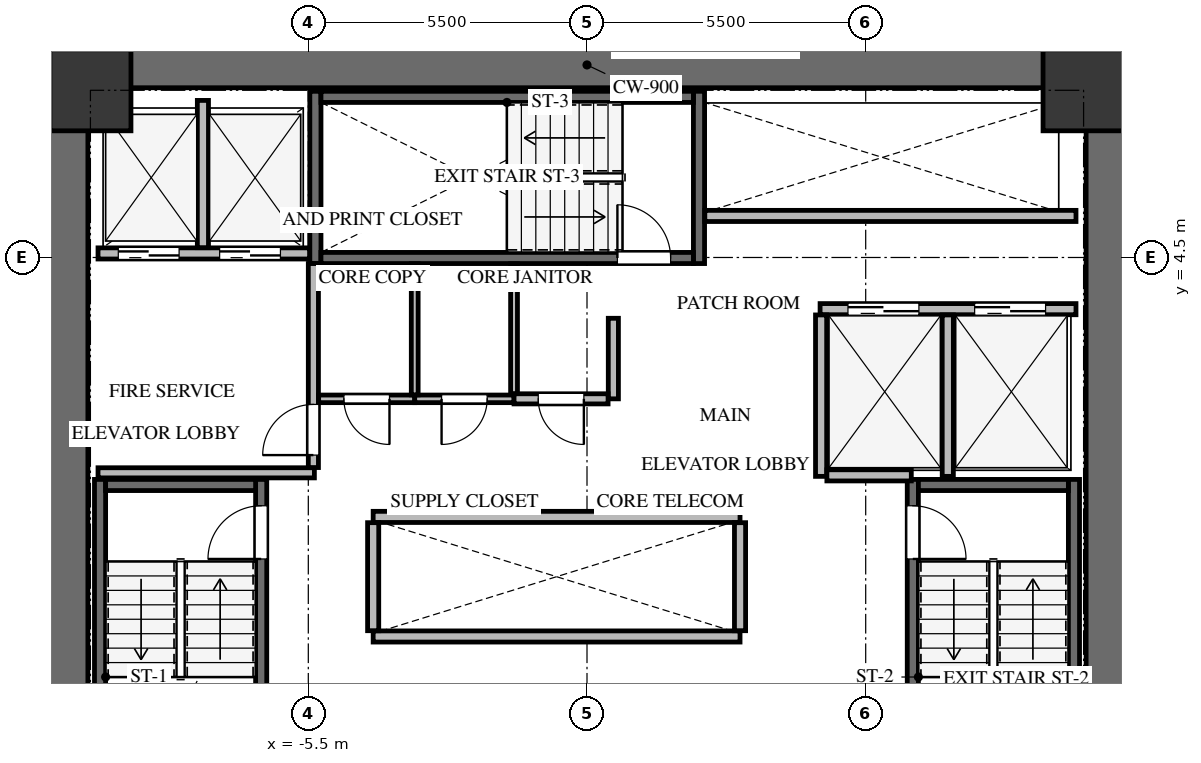
"""IFC4 building model, lengths in metres.
Left out: names, types, materials, properties, quantities, classifications, styles, units other than length and angle.
Written with IfcOpenShell. Run it as: python <this file> out.ifc"""

import sys

from ifc_helpers import new_model, si_unit, direction, frame, frame_2d, origin, origin_2d, place, context, subcontext, project, spatial, rectangle, extrude, source, transform, mapped, element, fill, save


model = new_model("IFC4")
c1 = context("Model", 3, precision=1e-05, world=origin(), true_north=direction((0.0, 1.0)))
c2 = subcontext(c1, "Body", "Model", "MODEL_VIEW")
j1 = project(units=[si_unit("LENGTHUNIT", "METRE"), si_unit("PLANEANGLEUNIT", "RADIAN")], contexts=[c1])
p1 = place(None, origin())
s1 = spatial("IfcSite", under=j1, at=p1, CompositionType="ELEMENT")
p2 = place(p1, origin())
s2 = spatial("IfcBuilding", under=s1, at=p2, CompositionType="ELEMENT")
p3 = place(p2, frame((0.0, 0.0, 78.3)))
s3 = spatial("IfcBuildingStorey", under=s2, at=p3, CompositionType="ELEMENT", Elevation=78.3)
for number, where, z_axis, x_axis in (
    (1, (-10.3, -8.75, 0.0), (0.0, 0.0, 1.0), (0.0, 1.0, 0.0)),
    (2, (10.3, -8.75, 0.0), (0.0, 0.0, 1.0), (0.0, 1.0, 0.0)),
):
    element("IfcWall", number, at=place(p3, frame(where, z_axis=z_axis, x_axis=x_axis)), inside=s3, PredefinedType="SHEAR", context=c2, shape_type="SweptSolid", body=[
        extrude(rectangle(XDim=17.5, YDim=0.9, at=frame_2d((8.75, 0.0))), origin(), (0.0, 0.0, 1.0), 3.0),
    ])
p4 = place(p3, frame((-9.85, 8.3, 0.0), z_axis=(0.0, 0.0, 1.0), x_axis=(1.0, 0.0, 0.0)))
e3 = element("IfcWall", 3, at=p4, inside=s3, PredefinedType="SHEAR", context=c2, shape_type="SweptSolid", body=[
    extrude(rectangle(XDim=19.7, YDim=0.9, at=frame_2d((9.85, 0.0))), origin(), (0.0, 0.0, 1.0), 3.0),
])
p5 = place(p3, frame((-6.43, -7.77, -0.24), z_axis=(0.0, 0.0, 1.0), x_axis=(0.0, 1.0, 0.0)))
e4 = element("IfcWall", 4, at=p5, inside=s3, PredefinedType="SHEAR", context=c2, shape_type="SweptSolid", body=[
    extrude(rectangle(XDim=7.89, YDim=0.22, at=frame_2d((3.945, 0.0))), origin(), (0.0, 0.0, 1.0), 3.0),
])
p6 = place(p5, frame((6.32, 0.0, 0.0)))
e5 = element("IfcOpeningElement", 5, at=p6, cuts=e4, PredefinedType="OPENING", context=c2, shape_type="SweptSolid", body=[
    extrude(rectangle(XDim=1.05, YDim=2.15, at=frame_2d((0.525, 1.075))), frame((0.0, 0.12, 0.0), z_axis=(0.0, -1.0, 0.0), x_axis=(1.0, 0.0, 0.0)), (0.0, 0.0, 1.0), 0.24),
])
p7 = place(p3, frame((-9.61, 0.12, -0.24), z_axis=(0.0, 0.0, 1.0), x_axis=(0.0, -1.0, 0.0)))
e6 = element("IfcWall", 6, at=p7, inside=s3, PredefinedType="SHEAR", context=c2, shape_type="SweptSolid", body=[
    extrude(rectangle(XDim=7.89, YDim=0.22, at=frame_2d((3.945, 0.0))), origin(), (0.0, 0.0, 1.0), 3.0),
])
p8 = place(p3, frame((-6.54, 0.01, -0.24), z_axis=(0.0, 0.0, 1.0), x_axis=(-1.0, 0.0, 0.0)))
e7 = element("IfcWall", 7, at=p8, inside=s3, PredefinedType="SHEAR", context=c2, shape_type="SweptSolid", body=[
    extrude(rectangle(XDim=2.96, YDim=0.22, at=frame_2d((1.48, 0.0))), origin(), (0.0, 0.0, 1.0), 3.0),
])
p9 = place(p3, frame((9.61, -7.77, -0.24), z_axis=(0.0, 0.0, 1.0), x_axis=(0.0, 1.0, 0.0)))
e8 = element("IfcWall", 8, at=p9, inside=s3, PredefinedType="SHEAR", context=c2, shape_type="SweptSolid", body=[
    extrude(rectangle(XDim=7.89, YDim=0.22, at=frame_2d((3.945, 0.0))), origin(), (0.0, 0.0, 1.0), 3.0),
])
p10 = place(p3, frame((6.43, 0.12, -0.24), z_axis=(0.0, 0.0, 1.0), x_axis=(0.0, -1.0, 0.0)))
e9 = element("IfcWall", 9, at=p10, inside=s3, PredefinedType="SHEAR", context=c2, shape_type="SweptSolid", body=[
    extrude(rectangle(XDim=7.89, YDim=0.22, at=frame_2d((3.945, 0.0))), origin(), (0.0, 0.0, 1.0), 3.0),
])
p11 = place(p10, frame((0.52, 0.0, 0.0)))
e10 = element("IfcOpeningElement", 10, at=p11, cuts=e9, PredefinedType="OPENING", context=c2, shape_type="SweptSolid", body=[
    extrude(rectangle(XDim=1.05, YDim=2.15, at=frame_2d((0.525, 1.075))), frame((0.0, 0.12, 0.0), z_axis=(0.0, -1.0, 0.0), x_axis=(1.0, 0.0, 0.0)), (0.0, 0.0, 1.0), 0.24),
])
p12 = place(p3, frame((9.5, 0.01, -0.24), z_axis=(0.0, 0.0, 1.0), x_axis=(-1.0, 0.0, 0.0)))
e11 = element("IfcWall", 11, at=p12, inside=s3, PredefinedType="SHEAR", context=c2, shape_type="SweptSolid", body=[
    extrude(rectangle(XDim=2.96, YDim=0.22, at=frame_2d((1.48, 0.0))), origin(), (0.0, 0.0, 1.0), 3.0),
])
for number, where, z_axis, x_axis in (
    (12, (2.21, 4.38, -0.24), (0.0, 0.0, 1.0), (0.0, 1.0, 0.0)),
    (13, (-5.36, 7.78, -0.24), (0.0, 0.0, 1.0), (0.0, -1.0, 0.0)),
):
    element("IfcWall", number, at=place(p3, frame(where, z_axis=z_axis, x_axis=x_axis)), inside=s3, PredefinedType="SHEAR", context=c2, shape_type="SweptSolid", body=[
        extrude(rectangle(XDim=3.4, YDim=0.22, at=frame_2d((1.7, 0.0))), origin(), (0.0, 0.0, 1.0), 3.0),
    ])
p13 = place(p3, frame((-5.25, 4.49, -0.24), z_axis=(0.0, 0.0, 1.0), x_axis=(1.0, 0.0, 0.0)))
e14 = element("IfcWall", 14, at=p13, inside=s3, PredefinedType="SHEAR", context=c2, shape_type="SweptSolid", body=[
    extrude(rectangle(XDim=7.35, YDim=0.22, at=frame_2d((3.675, 0.0))), origin(), (0.0, 0.0, 1.0), 3.0),
])
p14 = place(p13, frame((5.85, 0.0, 0.0)))
e15 = element("IfcOpeningElement", 15, at=p14, cuts=e14, PredefinedType="OPENING", context=c2, shape_type="SweptSolid", body=[
    extrude(rectangle(XDim=1.05, YDim=2.15, at=frame_2d((0.525, 1.075))), frame((0.0, 0.12, 0.0), z_axis=(0.0, -1.0, 0.0), x_axis=(1.0, 0.0, 0.0)), (0.0, 0.0, 1.0), 0.24),
])
p15 = place(p3, frame((2.1, 7.67, -0.24), z_axis=(0.0, 0.0, 1.0), x_axis=(-1.0, 0.0, 0.0)))
e16 = element("IfcWall", 16, at=p15, inside=s3, PredefinedType="SHEAR", context=c2, shape_type="SweptSolid", body=[
    extrude(rectangle(XDim=7.35, YDim=0.22, at=frame_2d((3.675, 0.0))), origin(), (0.0, 0.0, 1.0), 3.0),
])
m1 = source(origin(), c2, "Body", "SweptSolid", [
    extrude(rectangle(XDim=1.6, YDim=1.6, at=origin_2d()), origin(), (0.0, 0.0, 1.0), 3.0),
])
for number, where, z_axis, x_axis in (
    (17, (9.8, 7.8, -0.24), (0.0, 0.0, 1.0), (1.0, 0.0, 0.0)),
    (18, (-9.8, 7.8, -0.24), (0.0, 0.0, 1.0), (1.0, 0.0, 0.0)),
):
    element("IfcColumn", number, at=place(p3, frame(where, z_axis=z_axis, x_axis=x_axis)), inside=s3, PredefinedType="COLUMN", context=c2, shape_type="MappedRepresentation", body=[
        mapped(m1, transform((0.0, 0.0, 0.0), x_axis=(1.0, 0.0, 0.0), y_axis=(0.0, 1.0, 0.0), z_axis=(0.0, 0.0, 1.0), scale=1.0)),
    ])
p16 = place(p3, frame((-9.65, 4.58, 0.0), z_axis=(0.0, 0.0, 1.0), x_axis=(1.0, 0.0, 0.0)))
e19 = element("IfcWall", 19, at=p16, inside=s3, PredefinedType="SOLIDWALL", context=c2, shape_type="SweptSolid", body=[
    extrude(rectangle(XDim=4.175, YDim=0.22, at=frame_2d((2.087, 0.0))), origin(), (0.0, 0.0, 1.0), 2.745),
])
p17 = place(p16, frame((0.4, 0.0, 0.0)))
e20 = element("IfcOpeningElement", 20, at=p17, cuts=e19, PredefinedType="OPENING", context=c2, shape_type="SweptSolid", body=[
    extrude(rectangle(XDim=1.2, YDim=2.15, at=frame_2d((0.6, 1.075))), frame((0.0, 0.12, 0.0), z_axis=(0.0, -1.0, 0.0), x_axis=(1.0, 0.0, 0.0)), (0.0, 0.0, 1.0), 0.24),
])
p18 = place(p16, frame((2.4, 0.0, 0.0)))
e21 = element("IfcOpeningElement", 21, at=p18, cuts=e19, PredefinedType="OPENING", context=c2, shape_type="SweptSolid", body=[
    extrude(rectangle(XDim=1.2, YDim=2.15, at=frame_2d((0.6, 1.075))), frame((0.0, 0.12, 0.0), z_axis=(0.0, -1.0, 0.0), x_axis=(1.0, 0.0, 0.0)), (0.0, 0.0, 1.0), 0.24),
])
p19 = place(p3, frame((-7.58, 4.694, 0.0), z_axis=(0.0, 0.0, 1.0), x_axis=(0.0, 1.0, 0.0)))
e22 = element("IfcWall", 22, at=p19, inside=s3, PredefinedType="SOLIDWALL", context=c2, shape_type="SweptSolid", body=[
    extrude(rectangle(XDim=2.906, YDim=0.22, at=frame_2d((1.453, 0.0))), origin(), (0.0, 0.0, 1.0), 2.745),
])
p20 = place(p3, frame((-9.65, 0.25, 0.0), z_axis=(0.0, 0.0, 1.0), x_axis=(1.0, 0.0, 0.0)))
e23 = element("IfcWall", 23, at=p20, inside=s3, PredefinedType="SOLIDWALL", context=c2, shape_type="SweptSolid", body=[
    extrude(rectangle(XDim=4.27, YDim=0.2, at=frame_2d((2.135, 0.0))), origin(), (0.0, 0.0, 1.0), 2.745),
])
p21 = place(p3, frame((-5.4, 0.354, 0.0), z_axis=(0.0, 0.0, 1.0), x_axis=(0.0, 1.0, 0.0)))
e24 = element("IfcWall", 24, at=p21, inside=s3, PredefinedType="SOLIDWALL", context=c2, shape_type="SweptSolid", body=[
    extrude(rectangle(XDim=4.026, YDim=0.2, at=frame_2d((2.013, 0.0))), origin(), (0.0, 0.0, 1.0), 2.745),
])
p22 = place(p21, frame((0.246, 0.0, 0.0)))
e25 = element("IfcOpeningElement", 25, at=p22, cuts=e24, PredefinedType="OPENING", context=c2, shape_type="SweptSolid", body=[
    extrude(rectangle(XDim=1.0, YDim=2.15, at=frame_2d((0.5, 1.075))), frame((0.0, 0.11, 0.0), z_axis=(0.0, -1.0, 0.0), x_axis=(1.0, 0.0, 0.0)), (0.0, 0.0, 1.0), 0.22),
])
p23 = place(p3, frame((4.6, 3.48, 0.0), z_axis=(0.0, 0.0, 1.0), x_axis=(1.0, 0.0, 0.0)))
e26 = element("IfcWall", 26, at=p23, inside=s3, PredefinedType="SOLIDWALL", context=c2, shape_type="SweptSolid", body=[
    extrude(rectangle(XDim=5.05, YDim=0.22, at=frame_2d((2.525, 0.0))), origin(), (0.0, 0.0, 1.0), 2.745),
])
p24 = place(p23, frame((0.55, 0.0, 0.0)))
e27 = element("IfcOpeningElement", 27, at=p24, cuts=e26, PredefinedType="OPENING", context=c2, shape_type="SweptSolid", body=[
    extrude(rectangle(XDim=1.4, YDim=2.15, at=frame_2d((0.7, 1.075))), frame((0.0, 0.12, 0.0), z_axis=(0.0, -1.0, 0.0), x_axis=(1.0, 0.0, 0.0)), (0.0, 0.0, 1.0), 0.24),
])
p25 = place(p23, frame((3.05, 0.0, 0.0)))
e28 = element("IfcOpeningElement", 28, at=p25, cuts=e26, PredefinedType="OPENING", context=c2, shape_type="SweptSolid", body=[
    extrude(rectangle(XDim=1.4, YDim=2.15, at=frame_2d((0.7, 1.075))), frame((0.0, 0.12, 0.0), z_axis=(0.0, -1.0, 0.0), x_axis=(1.0, 0.0, 0.0)), (0.0, 0.0, 1.0), 0.24),
])
for number, where, z_axis, x_axis in (
    (29, (4.62, 0.18, 0.0), (0.0, 0.0, 1.0), (0.0, 1.0, 0.0)),
    (30, (7.12, 0.18, 0.0), (0.0, 0.0, 1.0), (0.0, 1.0, 0.0)),
):
    element("IfcWall", number, at=place(p3, frame(where, z_axis=z_axis, x_axis=x_axis)), inside=s3, PredefinedType="SOLIDWALL", context=c2, shape_type="SweptSolid", body=[
        extrude(rectangle(XDim=3.186, YDim=0.22, at=frame_2d((1.593, 0.0))), origin(), (0.0, 0.0, 1.0), 2.745),
    ])
p26 = place(p3, frame((4.734, 0.2, 0.0), z_axis=(0.0, 0.0, 1.0), x_axis=(1.0, 0.0, 0.0)))
e31 = element("IfcWall", 31, at=p26, inside=s3, PredefinedType="SOLIDWALL", context=c2, shape_type="SweptSolid", body=[
    extrude(rectangle(XDim=1.666, YDim=0.22, at=frame_2d((0.833, 0.0))), origin(), (0.0, 0.0, 1.0), 2.745),
])
for number, where, z_axis, x_axis in (
    (32, (-4.22, -2.98, 0.0), (0.0, 0.0, 1.0), (1.0, 0.0, 0.0)),
    (33, (-4.22, -0.62, 0.0), (0.0, 0.0, 1.0), (1.0, 0.0, 0.0)),
):
    element("IfcWall", number, at=place(p3, frame(where, z_axis=z_axis, x_axis=x_axis)), inside=s3, PredefinedType="SOLIDWALL", context=c2, shape_type="SweptSolid", body=[
        extrude(rectangle(XDim=7.24, YDim=0.22, at=frame_2d((3.62, 0.0))), origin(), (0.0, 0.0, 1.0), 2.745),
    ])
for number, where, z_axis, x_axis in (
    (34, (-4.22, -2.866, 0.0), (0.0, 0.0, 1.0), (0.0, 1.0, 0.0)),
    (35, (3.02, -2.866, 0.0), (0.0, 0.0, 1.0), (0.0, 1.0, 0.0)),
):
    element("IfcWall", number, at=place(p3, frame(where, z_axis=z_axis, x_axis=x_axis)), inside=s3, PredefinedType="SOLIDWALL", context=c2, shape_type="SweptSolid", body=[
        extrude(rectangle(XDim=2.132, YDim=0.22, at=frame_2d((1.066, 0.0))), origin(), (0.0, 0.0, 1.0), 2.745),
    ])
p27 = place(p3, frame((2.325, 5.32, 0.0), z_axis=(0.0, 0.0, 1.0), x_axis=(1.0, 0.0, 0.0)))
e36 = element("IfcWall", 36, at=p27, inside=s3, PredefinedType="SOLIDWALL", context=c2, shape_type="SweptSolid", body=[
    extrude(rectangle(XDim=7.325, YDim=0.22, at=frame_2d((3.663, 0.0))), origin(), (0.0, 0.0, 1.0), 2.745),
])
p28 = place(p3, frame((-3.4, 1.71, 0.0), z_axis=(0.0, 0.0, 1.0), x_axis=(-1.0, 0.0, 0.0)))
e37 = element("IfcWall", 37, at=p28, inside=s3, PredefinedType="PARTITIONING", context=c2, shape_type="SweptSolid", body=[
    extrude(rectangle(XDim=1.896, YDim=0.15, at=frame_2d((0.948, 0.0))), origin(), (0.0, 0.0, 1.0), 2.745),
])
p29 = place(p28, frame((0.498, 0.0, 0.0)))
e38 = element("IfcOpeningElement", 38, at=p29, cuts=e37, PredefinedType="OPENING", context=c2, shape_type="SweptSolid", body=[
    extrude(rectangle(XDim=0.9, YDim=2.05, at=frame_2d((0.45, 1.025))), frame((0.0, 0.085, 0.0), z_axis=(0.0, -1.0, 0.0), x_axis=(1.0, 0.0, 0.0)), (0.0, 0.0, 1.0), 0.17),
])
p30 = place(p3, frame((-1.44, 1.71, 0.0), z_axis=(0.0, 0.0, 1.0), x_axis=(-1.0, 0.0, 0.0)))
e39 = element("IfcWall", 39, at=p30, inside=s3, PredefinedType="PARTITIONING", context=c2, shape_type="SweptSolid", body=[
    extrude(rectangle(XDim=1.96, YDim=0.15, at=frame_2d((0.98, 0.0))), origin(), (0.0, 0.0, 1.0), 2.745),
])
p31 = place(p30, frame((0.53, 0.0, 0.0)))
e40 = element("IfcOpeningElement", 40, at=p31, cuts=e39, PredefinedType="OPENING", context=c2, shape_type="SweptSolid", body=[
    extrude(rectangle(XDim=0.9, YDim=2.05, at=frame_2d((0.45, 1.025))), frame((0.0, 0.085, 0.0), z_axis=(0.0, -1.0, 0.0), x_axis=(1.0, 0.0, 0.0)), (0.0, 0.0, 1.0), 0.17),
])
p32 = place(p3, frame((0.52, 3.3, 0.0), z_axis=(0.0, 0.0, 1.0), x_axis=(0.0, -1.0, 0.0)))
e41 = element("IfcWall", 41, at=p32, inside=s3, PredefinedType="SOLIDWALL", context=c2, shape_type="SweptSolid", body=[
    extrude(rectangle(XDim=1.59, YDim=0.2, at=frame_2d((0.795, 0.0))), origin(), (0.0, 0.0, 1.0), 2.745),
])
p33 = place(p3, frame((0.416, 1.71, 0.0), z_axis=(0.0, 0.0, 1.0), x_axis=(-1.0, 0.0, 0.0)))
e42 = element("IfcWall", 42, at=p33, inside=s3, PredefinedType="SOLIDWALL", context=c2, shape_type="SweptSolid", body=[
    extrude(rectangle(XDim=1.856, YDim=0.2, at=frame_2d((0.928, 0.0))), origin(), (0.0, 0.0, 1.0), 2.745),
])
p34 = place(p33, frame((0.478, 0.0, 0.0)))
e43 = element("IfcOpeningElement", 43, at=p34, cuts=e42, PredefinedType="OPENING", context=c2, shape_type="SweptSolid", body=[
    extrude(rectangle(XDim=0.9, YDim=2.05, at=frame_2d((0.45, 1.025))), frame((0.0, 0.11, 0.0), z_axis=(0.0, -1.0, 0.0), x_axis=(1.0, 0.0, 0.0)), (0.0, 0.0, 1.0), 0.22),
])
p35 = place(p3, frame((-3.4, 4.375, 0.0), z_axis=(0.0, 0.0, 1.0), x_axis=(0.0, -1.0, 0.0)))
e44 = element("IfcWall", 44, at=p35, inside=s3, PredefinedType="PARTITIONING", context=c2, shape_type="SweptSolid", body=[
    extrude(rectangle(XDim=2.586, YDim=0.135, at=frame_2d((1.293, 0.0))), origin(), (0.0, 0.0, 1.0), 2.745),
])
p36 = place(p3, frame((-1.44, 4.375, 0.0), z_axis=(0.0, 0.0, 1.0), x_axis=(0.0, -1.0, 0.0)))
e45 = element("IfcWall", 45, at=p36, inside=s3, PredefinedType="PARTITIONING", context=c2, shape_type="SweptSolid", body=[
    extrude(rectangle(XDim=2.561, YDim=0.135, at=frame_2d((1.281, 0.0))), origin(), (0.0, 0.0, 1.0), 2.745),
])
m2 = source(origin(), c2, "Body", "SweptSolid", [
    extrude(rectangle(XDim=1.05, YDim=2.15, at=frame_2d((0.525, 1.075))), frame((0.0, 0.025, 0.0), z_axis=(0.0, -1.0, 0.0), x_axis=(1.0, 0.0, 0.0)), (0.0, 0.0, 1.0), 0.05),
])
p37 = place(p6, origin())
e46 = element("IfcDoor", 46, at=p37, inside=s3, OperationType="SINGLE_SWING_LEFT", PredefinedType="DOOR", context=c2, shape_type="MappedRepresentation", body=[
    mapped(m2, transform((0.0, 0.0, 0.0), x_axis=(1.0, 0.0, 0.0), y_axis=(0.0, 1.0, 0.0), z_axis=(0.0, 0.0, 1.0), scale=1.0)),
])
fill(e5, e46)
m3 = source(origin(), c2, "Body", "SweptSolid", [
    extrude(rectangle(XDim=1.05, YDim=2.15, at=frame_2d((0.525, 1.075))), frame((0.0, 0.025, 0.0), z_axis=(0.0, -1.0, 0.0), x_axis=(1.0, 0.0, 0.0)), (0.0, 0.0, 1.0), 0.05),
])
p38 = place(p11, origin())
e47 = element("IfcDoor", 47, at=p38, inside=s3, OperationType="SINGLE_SWING_RIGHT", PredefinedType="DOOR", context=c2, shape_type="MappedRepresentation", body=[
    mapped(m3, transform((0.0, 0.0, 0.0), x_axis=(1.0, 0.0, 0.0), y_axis=(0.0, 1.0, 0.0), z_axis=(0.0, 0.0, 1.0), scale=1.0)),
])
fill(e10, e47)
p39 = place(p14, origin())
e48 = element("IfcDoor", 48, at=p39, inside=s3, OperationType="SINGLE_SWING_LEFT", PredefinedType="DOOR", context=c2, shape_type="MappedRepresentation", body=[
    mapped(m2, transform((0.0, 0.0, 0.0), x_axis=(1.0, 0.0, 0.0), y_axis=(0.0, 1.0, 0.0), z_axis=(0.0, 0.0, 1.0), scale=1.0)),
])
fill(e15, e48)
m4 = source(origin(), c2, "Body", "SweptSolid", [
    extrude(rectangle(XDim=1.2, YDim=2.15, at=frame_2d((0.6, 1.075))), frame((0.0, 0.025, 0.0), z_axis=(0.0, -1.0, 0.0), x_axis=(1.0, 0.0, 0.0)), (0.0, 0.0, 1.0), 0.05),
])
p40 = place(p17, origin())
e49 = element("IfcDoor", 49, at=p40, inside=s3, OperationType="DOUBLE_DOOR_SLIDING", PredefinedType="DOOR", context=c2, shape_type="MappedRepresentation", body=[
    mapped(m4, transform((0.0, 0.0, 0.0), x_axis=(1.0, 0.0, 0.0), y_axis=(0.0, 1.0, 0.0), z_axis=(0.0, 0.0, 1.0), scale=1.0)),
])
fill(e20, e49)
p41 = place(p18, origin())
e50 = element("IfcDoor", 50, at=p41, inside=s3, OperationType="DOUBLE_DOOR_SLIDING", PredefinedType="DOOR", context=c2, shape_type="MappedRepresentation", body=[
    mapped(m4, transform((0.0, 0.0, 0.0), x_axis=(1.0, 0.0, 0.0), y_axis=(0.0, 1.0, 0.0), z_axis=(0.0, 0.0, 1.0), scale=1.0)),
])
fill(e21, e50)
m5 = source(origin(), c2, "Body", "SweptSolid", [
    extrude(rectangle(XDim=1.0, YDim=2.15, at=frame_2d((0.5, 1.075))), frame((0.0, 0.025, 0.0), z_axis=(0.0, -1.0, 0.0), x_axis=(1.0, 0.0, 0.0)), (0.0, 0.0, 1.0), 0.05),
])
p42 = place(p22, origin())
e51 = element("IfcDoor", 51, at=p42, inside=s3, OperationType="SINGLE_SWING_LEFT", PredefinedType="DOOR", context=c2, shape_type="MappedRepresentation", body=[
    mapped(m5, transform((0.0, 0.0, 0.0), x_axis=(1.0, 0.0, 0.0), y_axis=(0.0, 1.0, 0.0), z_axis=(0.0, 0.0, 1.0), scale=1.0)),
])
fill(e25, e51)
m6 = source(origin(), c2, "Body", "SweptSolid", [
    extrude(rectangle(XDim=1.4, YDim=2.15, at=frame_2d((0.7, 1.075))), frame((0.0, 0.025, 0.0), z_axis=(0.0, -1.0, 0.0), x_axis=(1.0, 0.0, 0.0)), (0.0, 0.0, 1.0), 0.05),
])
p43 = place(p24, origin())
e52 = element("IfcDoor", 52, at=p43, inside=s3, OperationType="DOUBLE_DOOR_SLIDING", PredefinedType="DOOR", context=c2, shape_type="MappedRepresentation", body=[
    mapped(m6, transform((0.0, 0.0, 0.0), x_axis=(1.0, 0.0, 0.0), y_axis=(0.0, 1.0, 0.0), z_axis=(0.0, 0.0, 1.0), scale=1.0)),
])
fill(e27, e52)
p44 = place(p25, origin())
e53 = element("IfcDoor", 53, at=p44, inside=s3, OperationType="DOUBLE_DOOR_SLIDING", PredefinedType="DOOR", context=c2, shape_type="MappedRepresentation", body=[
    mapped(m6, transform((0.0, 0.0, 0.0), x_axis=(1.0, 0.0, 0.0), y_axis=(0.0, 1.0, 0.0), z_axis=(0.0, 0.0, 1.0), scale=1.0)),
])
fill(e28, e53)
m7 = source(origin(), c2, "Body", "SweptSolid", [
    extrude(rectangle(XDim=0.9, YDim=2.05, at=frame_2d((0.45, 1.025))), frame((0.0, 0.025, 0.0), z_axis=(0.0, -1.0, 0.0), x_axis=(1.0, 0.0, 0.0)), (0.0, 0.0, 1.0), 0.05),
])
p45 = place(p29, origin())
e54 = element("IfcDoor", 54, at=p45, inside=s3, OperationType="SINGLE_SWING_LEFT", PredefinedType="DOOR", context=c2, shape_type="MappedRepresentation", body=[
    mapped(m7, transform((0.0, 0.0, 0.0), x_axis=(1.0, 0.0, 0.0), y_axis=(0.0, 1.0, 0.0), z_axis=(0.0, 0.0, 1.0), scale=1.0)),
])
fill(e38, e54)
m8 = source(origin(), c2, "Body", "SweptSolid", [
    extrude(rectangle(XDim=0.9, YDim=2.05, at=frame_2d((0.45, 1.025))), frame((0.0, 0.025, 0.0), z_axis=(0.0, -1.0, 0.0), x_axis=(1.0, 0.0, 0.0)), (0.0, 0.0, 1.0), 0.05),
])
p46 = place(p31, origin())
e55 = element("IfcDoor", 55, at=p46, inside=s3, OperationType="SINGLE_SWING_RIGHT", PredefinedType="DOOR", context=c2, shape_type="MappedRepresentation", body=[
    mapped(m8, transform((0.0, 0.0, 0.0), x_axis=(1.0, 0.0, 0.0), y_axis=(0.0, 1.0, 0.0), z_axis=(0.0, 0.0, 1.0), scale=1.0)),
])
fill(e40, e55)
p47 = place(p34, origin())
e56 = element("IfcDoor", 56, at=p47, inside=s3, OperationType="SINGLE_SWING_LEFT", PredefinedType="DOOR", context=c2, shape_type="MappedRepresentation", body=[
    mapped(m7, transform((0.0, 0.0, 0.0), x_axis=(1.0, 0.0, 0.0), y_axis=(0.0, 1.0, 0.0), z_axis=(0.0, 0.0, 1.0), scale=1.0)),
])
fill(e43, e56)
save(model, sys.argv[1])
